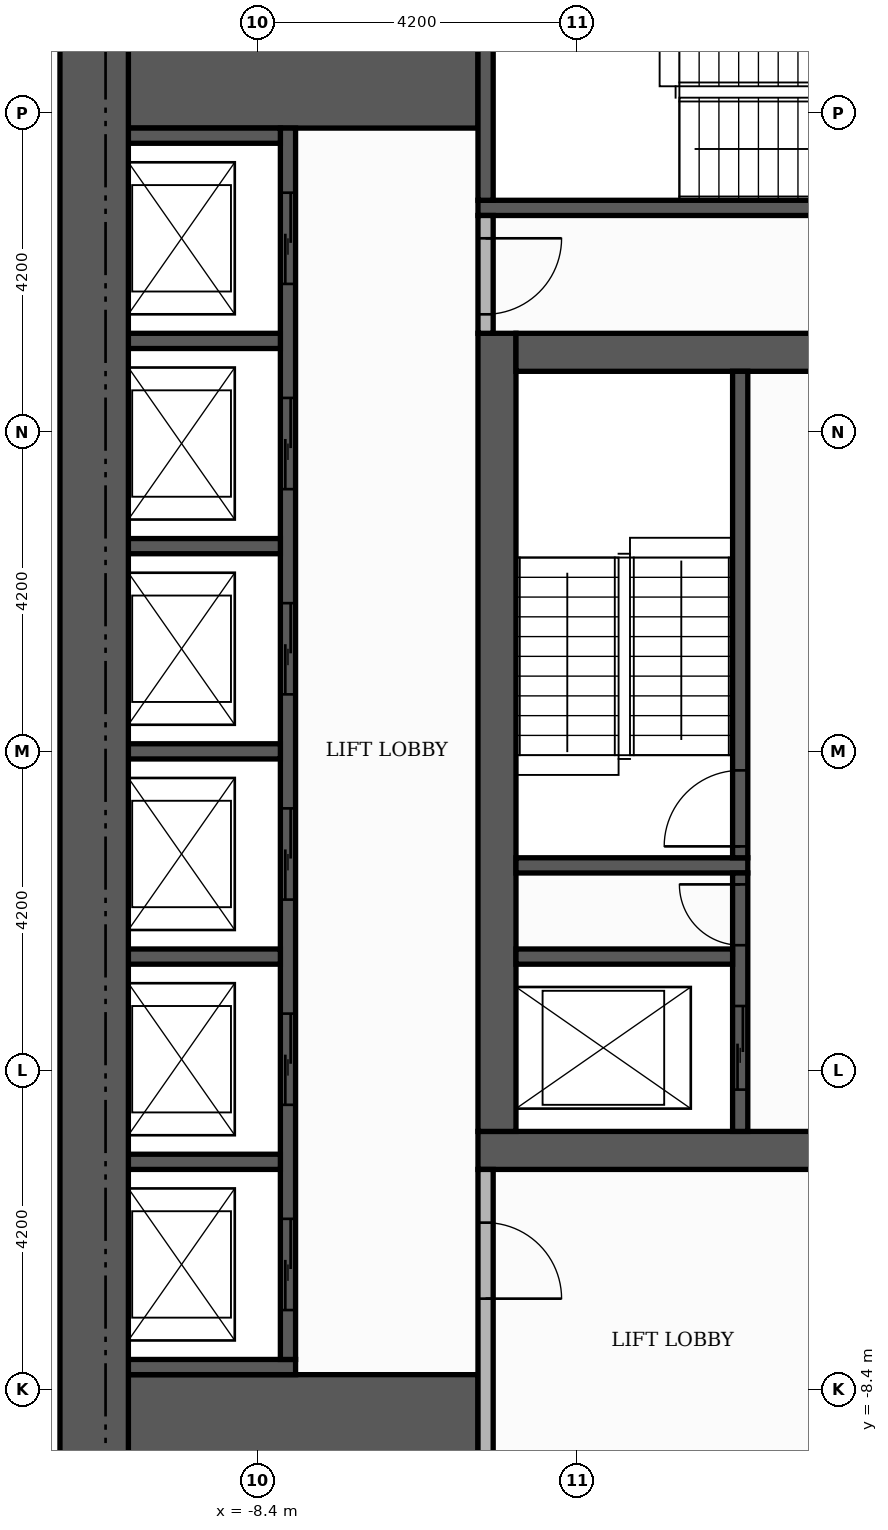
"""IFC4 building model, lengths in metres.
Left out: names, types, materials, properties, quantities, classifications, styles, units other than length and angle.
Written with IfcOpenShell. Run it as: python <this file> out.ifc"""

import sys

from ifc_helpers import new_model, si_unit, direction, frame, frame_2d, origin, place, context, subcontext, project, spatial, rectangle, extrude, element, fill, save


model = new_model("IFC4")
c1 = context("Model", 3, precision=1e-05, world=origin(), true_north=direction((0.0, 1.0)))
c2 = subcontext(c1, "Body", "Model", "MODEL_VIEW")
j1 = project(units=[si_unit("LENGTHUNIT", "METRE"), si_unit("PLANEANGLEUNIT", "RADIAN")], contexts=[c1])
p1 = place(None, origin())
s1 = spatial("IfcSite", under=j1, at=p1, CompositionType="ELEMENT")
p2 = place(p1, origin())
s2 = spatial("IfcBuilding", under=s1, at=p2, CompositionType="ELEMENT")
p3 = place(p2, frame((0.0, 0.0, 79.2)))
s3 = spatial("IfcBuildingStorey", under=s2, at=p3, CompositionType="ELEMENT", Elevation=79.2)
p4 = place(p3, frame((-5.5, -5.25, 0.0), z_axis=(0.0, 0.0, 1.0), x_axis=(1.0, 0.0, 0.0)))
e1 = element("IfcWall", 1, at=p4, inside=s3, PredefinedType="SHEAR", context=c2, shape_type="SweptSolid", body=[
    extrude(rectangle(XDim=11.0, YDim=0.5, at=frame_2d((5.5, 0.0))), origin(), (0.0, 0.0, 1.0), 3.48),
])
p5 = place(p4, frame((4.9, 0.0, 0.0)))
e2 = element("IfcOpeningElement", 2, at=p5, cuts=e1, PredefinedType="OPENING", context=c2, shape_type="SweptSolid", body=[
    extrude(rectangle(XDim=1.2, YDim=2.1, at=frame_2d((0.6, 1.05))), frame((0.0, 0.26, 0.0), z_axis=(0.0, -1.0, 0.0), x_axis=(1.0, 0.0, 0.0)), (0.0, 0.0, 1.0), 0.52),
])
p6 = place(p3, frame((-5.25, -5.0, 0.0), z_axis=(0.0, 0.0, 1.0), x_axis=(0.0, 1.0, 0.0)))
e3 = element("IfcWall", 3, at=p6, inside=s3, PredefinedType="SHEAR", context=c2, shape_type="SweptSolid", body=[
    extrude(rectangle(XDim=10.5, YDim=0.5, at=frame_2d((5.25, 0.0))), origin(), (0.0, 0.0, 1.0), 3.48),
])
p7 = place(p3, frame((-5.0, 5.25, 0.0), z_axis=(0.0, 0.0, 1.0), x_axis=(1.0, 0.0, 0.0)))
e4 = element("IfcWall", 4, at=p7, inside=s3, PredefinedType="SHEAR", context=c2, shape_type="SweptSolid", body=[
    extrude(rectangle(XDim=10.0, YDim=0.5, at=frame_2d((5.0, 0.0))), origin(), (0.0, 0.0, 1.0), 3.48),
])
p8 = place(p7, frame((4.4, 0.0, 0.0)))
e5 = element("IfcOpeningElement", 5, at=p8, cuts=e4, PredefinedType="OPENING", context=c2, shape_type="SweptSolid", body=[
    extrude(rectangle(XDim=1.2, YDim=2.1, at=frame_2d((0.6, 1.05))), frame((0.0, 0.26, 0.0), z_axis=(0.0, -1.0, 0.0), x_axis=(1.0, 0.0, 0.0)), (0.0, 0.0, 1.0), 0.52),
])
for number, where, z_axis, x_axis in (
    (6, (-10.1, -9.15, 0.0), (0.0, 0.0, 1.0), (1.0, 0.0, 0.0)),
    (7, (-10.1, 9.15, 0.0), (0.0, 0.0, 1.0), (1.0, 0.0, 0.0)),
):
    element("IfcWall", number, at=place(p3, frame(where, z_axis=z_axis, x_axis=x_axis)), inside=s3, PredefinedType="SHEAR", context=c2, shape_type="SweptSolid", body=[
        extrude(rectangle(XDim=4.6, YDim=1.9, at=frame_2d((2.3, 0.0))), origin(), (0.0, 0.0, 1.0), 3.48),
    ])
p9 = place(p3, frame((-5.0, -1.5, 0.0), z_axis=(0.0, 0.0, 1.0), x_axis=(1.0, 0.0, 0.0)))
e8 = element("IfcWall", 8, at=p9, inside=s3, PredefinedType="SHEAR", context=c2, shape_type="SweptSolid", body=[
    extrude(rectangle(XDim=3.05, YDim=0.2, at=frame_2d((1.525, 0.0))), origin(), (0.0, 0.0, 1.0), 3.48),
])
p10 = place(p3, frame((-2.05, -1.4, 0.0), z_axis=(0.0, 0.0, 1.0), x_axis=(0.0, 1.0, 0.0)))
e9 = element("IfcWall", 9, at=p10, inside=s3, PredefinedType="SHEAR", context=c2, shape_type="SweptSolid", body=[
    extrude(rectangle(XDim=6.4, YDim=0.2, at=frame_2d((3.2, 0.0))), origin(), (0.0, 0.0, 1.0), 3.48),
])
p11 = place(p10, frame((0.15, 0.0, 0.0)))
e10 = element("IfcOpeningElement", 10, at=p11, cuts=e9, PredefinedType="OPENING", context=c2, shape_type="SweptSolid", body=[
    extrude(rectangle(XDim=1.0, YDim=2.1, at=frame_2d((0.5, 1.05))), frame((0.0, 0.11, 0.0), z_axis=(0.0, -1.0, 0.0), x_axis=(1.0, 0.0, 0.0)), (0.0, 0.0, 1.0), 0.22),
])
p12 = place(p3, frame((-5.5, 7.15, 0.0), z_axis=(0.0, 0.0, 1.0), x_axis=(1.0, 0.0, 0.0)))
e11 = element("IfcWall", 11, at=p12, inside=s3, PredefinedType="SHEAR", context=c2, shape_type="SweptSolid", body=[
    extrude(rectangle(XDim=6.8, YDim=0.2, at=frame_2d((3.4, 0.0))), origin(), (0.0, 0.0, 1.0), 3.48),
])
p13 = place(p3, frame((-5.4, 7.25, 0.0), z_axis=(0.0, 0.0, 1.0), x_axis=(0.0, 1.0, 0.0)))
e12 = element("IfcWall", 12, at=p13, inside=s3, PredefinedType="SHEAR", context=c2, shape_type="SweptSolid", body=[
    extrude(rectangle(XDim=2.85, YDim=0.2, at=frame_2d((1.425, 0.0))), origin(), (0.0, 0.0, 1.0), 3.48),
])
p14 = place(p3, frame((-10.1, -8.1, 0.0), z_axis=(0.0, 0.0, 1.0), x_axis=(1.0, 0.0, 0.0)))
e13 = element("IfcWall", 13, at=p14, inside=s3, PredefinedType="SHEAR", context=c2, shape_type="SweptSolid", body=[
    extrude(rectangle(XDim=2.2, YDim=0.2, at=frame_2d((1.1, 0.0))), origin(), (0.0, 0.0, 1.0), 3.48),
])
p15 = place(p3, frame((-8.0, -8.0, 0.0), z_axis=(0.0, 0.0, 1.0), x_axis=(0.0, 1.0, 0.0)))
e14 = element("IfcWall", 14, at=p15, inside=s3, PredefinedType="SHEAR", context=c2, shape_type="SweptSolid", body=[
    extrude(rectangle(XDim=16.2, YDim=0.2, at=frame_2d((8.1, 0.0))), origin(), (0.0, 0.0, 1.0), 3.48),
])
p16 = place(p15, frame((0.65, 0.0, 0.0)))
e15 = element("IfcOpeningElement", 15, at=p16, cuts=e14, PredefinedType="OPENING", context=c2, shape_type="SweptSolid", body=[
    extrude(rectangle(XDim=1.2, YDim=2.1, at=frame_2d((0.6, 1.05))), frame((0.0, 0.11, 0.0), z_axis=(0.0, -1.0, 0.0), x_axis=(1.0, 0.0, 0.0)), (0.0, 0.0, 1.0), 0.22),
])
p17 = place(p15, frame((3.35, 0.0, 0.0)))
e16 = element("IfcOpeningElement", 16, at=p17, cuts=e14, PredefinedType="OPENING", context=c2, shape_type="SweptSolid", body=[
    extrude(rectangle(XDim=1.2, YDim=2.1, at=frame_2d((0.6, 1.05))), frame((0.0, 0.11, 0.0), z_axis=(0.0, -1.0, 0.0), x_axis=(1.0, 0.0, 0.0)), (0.0, 0.0, 1.0), 0.22),
])
p18 = place(p15, frame((6.05, 0.0, 0.0)))
e17 = element("IfcOpeningElement", 17, at=p18, cuts=e14, PredefinedType="OPENING", context=c2, shape_type="SweptSolid", body=[
    extrude(rectangle(XDim=1.2, YDim=2.1, at=frame_2d((0.6, 1.05))), frame((0.0, 0.11, 0.0), z_axis=(0.0, -1.0, 0.0), x_axis=(1.0, 0.0, 0.0)), (0.0, 0.0, 1.0), 0.22),
])
p19 = place(p15, frame((8.75, 0.0, 0.0)))
e18 = element("IfcOpeningElement", 18, at=p19, cuts=e14, PredefinedType="OPENING", context=c2, shape_type="SweptSolid", body=[
    extrude(rectangle(XDim=1.2, YDim=2.1, at=frame_2d((0.6, 1.05))), frame((0.0, 0.11, 0.0), z_axis=(0.0, -1.0, 0.0), x_axis=(1.0, 0.0, 0.0)), (0.0, 0.0, 1.0), 0.22),
])
p20 = place(p15, frame((11.45, 0.0, 0.0)))
e19 = element("IfcOpeningElement", 19, at=p20, cuts=e14, PredefinedType="OPENING", context=c2, shape_type="SweptSolid", body=[
    extrude(rectangle(XDim=1.2, YDim=2.1, at=frame_2d((0.6, 1.05))), frame((0.0, 0.11, 0.0), z_axis=(0.0, -1.0, 0.0), x_axis=(1.0, 0.0, 0.0)), (0.0, 0.0, 1.0), 0.22),
])
p21 = place(p15, frame((14.15, 0.0, 0.0)))
e20 = element("IfcOpeningElement", 20, at=p21, cuts=e14, PredefinedType="OPENING", context=c2, shape_type="SweptSolid", body=[
    extrude(rectangle(XDim=1.2, YDim=2.1, at=frame_2d((0.6, 1.05))), frame((0.0, 0.11, 0.0), z_axis=(0.0, -1.0, 0.0), x_axis=(1.0, 0.0, 0.0)), (0.0, 0.0, 1.0), 0.22),
])
p22 = place(p3, frame((-10.1, -5.4, 0.0), z_axis=(0.0, 0.0, 1.0), x_axis=(1.0, 0.0, 0.0)))
e21 = element("IfcWall", 21, at=p22, inside=s3, PredefinedType="SHEAR", context=c2, shape_type="SweptSolid", body=[
    extrude(rectangle(XDim=2.0, YDim=0.2, at=frame_2d((1.0, 0.0))), origin(), (0.0, 0.0, 1.0), 3.48),
])
p23 = place(p3, frame((-2.05, -5.0, 0.0), z_axis=(0.0, 0.0, 1.0), x_axis=(0.0, 1.0, 0.0)))
e22 = element("IfcWall", 22, at=p23, inside=s3, PredefinedType="SHEAR", context=c2, shape_type="SweptSolid", body=[
    extrude(rectangle(XDim=3.4, YDim=0.2, at=frame_2d((1.7, 0.0))), origin(), (0.0, 0.0, 1.0), 3.48),
])
p24 = place(p23, frame((0.55, 0.0, 0.0)))
e23 = element("IfcOpeningElement", 23, at=p24, cuts=e22, PredefinedType="OPENING", context=c2, shape_type="SweptSolid", body=[
    extrude(rectangle(XDim=1.1, YDim=2.1, at=frame_2d((0.55, 1.05))), frame((0.0, 0.11, 0.0), z_axis=(0.0, -1.0, 0.0), x_axis=(1.0, 0.0, 0.0)), (0.0, 0.0, 1.0), 0.22),
])
p25 = place(p23, frame((2.45, 0.0, 0.0)))
e24 = element("IfcOpeningElement", 24, at=p25, cuts=e22, PredefinedType="OPENING", context=c2, shape_type="SweptSolid", body=[
    extrude(rectangle(XDim=0.8, YDim=2.1, at=frame_2d((0.4, 1.05))), frame((0.0, 0.11, 0.0), z_axis=(0.0, -1.0, 0.0), x_axis=(1.0, 0.0, 0.0)), (0.0, 0.0, 1.0), 0.22),
])
p26 = place(p3, frame((-10.1, -2.7, 0.0), z_axis=(0.0, 0.0, 1.0), x_axis=(1.0, 0.0, 0.0)))
e25 = element("IfcWall", 25, at=p26, inside=s3, PredefinedType="SHEAR", context=c2, shape_type="SweptSolid", body=[
    extrude(rectangle(XDim=2.0, YDim=0.2, at=frame_2d((1.0, 0.0))), origin(), (0.0, 0.0, 1.0), 3.48),
])
p27 = place(p3, frame((-5.0, -2.7, 0.0), z_axis=(0.0, 0.0, 1.0), x_axis=(1.0, 0.0, 0.0)))
e26 = element("IfcWall", 26, at=p27, inside=s3, PredefinedType="SHEAR", context=c2, shape_type="SweptSolid", body=[
    extrude(rectangle(XDim=2.85, YDim=0.2, at=frame_2d((1.425, 0.0))), origin(), (0.0, 0.0, 1.0), 3.48),
])
for number, where, z_axis, x_axis in (
    (27, (-10.1, 0.0, 0.0), (0.0, 0.0, 1.0), (1.0, 0.0, 0.0)),
    (28, (-10.1, 2.7, 0.0), (0.0, 0.0, 1.0), (1.0, 0.0, 0.0)),
    (29, (-10.1, 5.4, 0.0), (0.0, 0.0, 1.0), (1.0, 0.0, 0.0)),
    (30, (-10.1, 8.1, 0.0), (0.0, 0.0, 1.0), (1.0, 0.0, 0.0)),
):
    element("IfcWall", number, at=place(p3, frame(where, z_axis=z_axis, x_axis=x_axis)), inside=s3, PredefinedType="SHEAR", context=c2, shape_type="SweptSolid", body=[
        extrude(rectangle(XDim=2.0, YDim=0.2, at=frame_2d((1.0, 0.0))), origin(), (0.0, 0.0, 1.0), 3.48),
    ])
p28 = place(p3, frame((-10.55, -10.1, 0.0), z_axis=(0.0, 0.0, 1.0), x_axis=(0.0, 1.0, 0.0)))
e31 = element("IfcWall", 31, at=p28, inside=s3, PredefinedType="SHEAR", context=c2, shape_type="SweptSolid", body=[
    extrude(rectangle(XDim=20.2, YDim=0.9, at=frame_2d((10.1, 0.0))), origin(), (0.0, 0.0, 1.0), 3.48),
])
p29 = place(p3, frame((-5.4, -10.1, 0.0), z_axis=(0.0, 0.0, 1.0), x_axis=(0.0, 1.0, 0.0)))
e32 = element("IfcWall", 32, at=p29, inside=s3, PredefinedType="PARTITIONING", context=c2, shape_type="SweptSolid", body=[
    extrude(rectangle(XDim=4.6, YDim=0.2, at=frame_2d((2.3, 0.0))), origin(), (0.0, 0.0, 1.0), 3.48),
])
p30 = place(p29, frame((2.9, 0.0, 0.0)))
e33 = element("IfcOpeningElement", 33, at=p30, cuts=e32, PredefinedType="OPENING", context=c2, shape_type="SweptSolid", body=[
    extrude(rectangle(XDim=1.0, YDim=2.1, at=frame_2d((0.5, 1.05))), frame((0.0, 0.11, 0.0), z_axis=(0.0, -1.0, 0.0), x_axis=(1.0, 0.0, 0.0)), (0.0, 0.0, 1.0), 0.22),
])
p31 = place(p3, frame((-5.4, 5.5, 0.0), z_axis=(0.0, 0.0, 1.0), x_axis=(0.0, 1.0, 0.0)))
e34 = element("IfcWall", 34, at=p31, inside=s3, PredefinedType="PARTITIONING", context=c2, shape_type="SweptSolid", body=[
    extrude(rectangle(XDim=1.55, YDim=0.2, at=frame_2d((0.775, 0.0))), origin(), (0.0, 0.0, 1.0), 3.48),
])
p32 = place(p31, frame((0.25, 0.0, 0.0)))
e35 = element("IfcOpeningElement", 35, at=p32, cuts=e34, PredefinedType="OPENING", context=c2, shape_type="SweptSolid", body=[
    extrude(rectangle(XDim=1.0, YDim=2.1, at=frame_2d((0.5, 1.05))), frame((0.0, 0.11, 0.0), z_axis=(0.0, -1.0, 0.0), x_axis=(1.0, 0.0, 0.0)), (0.0, 0.0, 1.0), 0.22),
])
p33 = place(p16, origin())
e36 = element("IfcDoor", 36, at=p33, inside=s3, OperationType="SLIDING_TO_LEFT", PredefinedType="DOOR", context=c2, shape_type="SweptSolid", body=[
    extrude(rectangle(XDim=1.2, YDim=2.1, at=frame_2d((0.6, 1.05))), frame((0.0, 0.025, 0.0), z_axis=(0.0, -1.0, 0.0), x_axis=(1.0, 0.0, 0.0)), (0.0, 0.0, 1.0), 0.05),
])
fill(e15, e36)
p34 = place(p17, origin())
e37 = element("IfcDoor", 37, at=p34, inside=s3, OperationType="SLIDING_TO_LEFT", PredefinedType="DOOR", context=c2, shape_type="SweptSolid", body=[
    extrude(rectangle(XDim=1.2, YDim=2.1, at=frame_2d((0.6, 1.05))), frame((0.0, 0.025, 0.0), z_axis=(0.0, -1.0, 0.0), x_axis=(1.0, 0.0, 0.0)), (0.0, 0.0, 1.0), 0.05),
])
fill(e16, e37)
p35 = place(p18, origin())
e38 = element("IfcDoor", 38, at=p35, inside=s3, OperationType="SLIDING_TO_LEFT", PredefinedType="DOOR", context=c2, shape_type="SweptSolid", body=[
    extrude(rectangle(XDim=1.2, YDim=2.1, at=frame_2d((0.6, 1.05))), frame((0.0, 0.025, 0.0), z_axis=(0.0, -1.0, 0.0), x_axis=(1.0, 0.0, 0.0)), (0.0, 0.0, 1.0), 0.05),
])
fill(e17, e38)
p36 = place(p19, origin())
e39 = element("IfcDoor", 39, at=p36, inside=s3, OperationType="SLIDING_TO_LEFT", PredefinedType="DOOR", context=c2, shape_type="SweptSolid", body=[
    extrude(rectangle(XDim=1.2, YDim=2.1, at=frame_2d((0.6, 1.05))), frame((0.0, 0.025, 0.0), z_axis=(0.0, -1.0, 0.0), x_axis=(1.0, 0.0, 0.0)), (0.0, 0.0, 1.0), 0.05),
])
fill(e18, e39)
p37 = place(p20, origin())
e40 = element("IfcDoor", 40, at=p37, inside=s3, OperationType="SLIDING_TO_LEFT", PredefinedType="DOOR", context=c2, shape_type="SweptSolid", body=[
    extrude(rectangle(XDim=1.2, YDim=2.1, at=frame_2d((0.6, 1.05))), frame((0.0, 0.025, 0.0), z_axis=(0.0, -1.0, 0.0), x_axis=(1.0, 0.0, 0.0)), (0.0, 0.0, 1.0), 0.05),
])
fill(e19, e40)
p38 = place(p21, origin())
e41 = element("IfcDoor", 41, at=p38, inside=s3, OperationType="SLIDING_TO_LEFT", PredefinedType="DOOR", context=c2, shape_type="SweptSolid", body=[
    extrude(rectangle(XDim=1.2, YDim=2.1, at=frame_2d((0.6, 1.05))), frame((0.0, 0.025, 0.0), z_axis=(0.0, -1.0, 0.0), x_axis=(1.0, 0.0, 0.0)), (0.0, 0.0, 1.0), 0.05),
])
fill(e20, e41)
p39 = place(p24, origin())
e42 = element("IfcDoor", 42, at=p39, inside=s3, OperationType="SLIDING_TO_LEFT", PredefinedType="DOOR", context=c2, shape_type="SweptSolid", body=[
    extrude(rectangle(XDim=1.1, YDim=2.1, at=frame_2d((0.55, 1.05))), frame((0.0, 0.025, 0.0), z_axis=(0.0, -1.0, 0.0), x_axis=(1.0, 0.0, 0.0)), (0.0, 0.0, 1.0), 0.05),
])
fill(e23, e42)
p40 = place(p11, origin())
e43 = element("IfcDoor", 43, at=p40, inside=s3, OperationType="SINGLE_SWING_LEFT", PredefinedType="DOOR", context=c2, shape_type="SweptSolid", body=[
    extrude(rectangle(XDim=1.0, YDim=2.1, at=frame_2d((0.5, 1.05))), frame((0.0, 0.025, 0.0), z_axis=(0.0, -1.0, 0.0), x_axis=(1.0, 0.0, 0.0)), (0.0, 0.0, 1.0), 0.05),
])
fill(e10, e43)
p41 = place(p25, origin())
e44 = element("IfcDoor", 44, at=p41, inside=s3, OperationType="SINGLE_SWING_RIGHT", PredefinedType="DOOR", context=c2, shape_type="SweptSolid", body=[
    extrude(rectangle(XDim=0.8, YDim=2.1, at=frame_2d((0.4, 1.05))), frame((0.0, 0.025, 0.0), z_axis=(0.0, -1.0, 0.0), x_axis=(1.0, 0.0, 0.0)), (0.0, 0.0, 1.0), 0.05),
])
fill(e24, e44)
p42 = place(p32, frame((1.0, 0.0, 0.0), z_axis=(0.0, 0.0, 1.0), x_axis=(-1.0, 0.0, 0.0)))
e45 = element("IfcDoor", 45, at=p42, inside=s3, OperationType="SINGLE_SWING_RIGHT", PredefinedType="DOOR", context=c2, shape_type="SweptSolid", body=[
    extrude(rectangle(XDim=1.0, YDim=2.1, at=frame_2d((0.5, 1.05))), frame((0.0, 0.025, 0.0), z_axis=(0.0, -1.0, 0.0), x_axis=(1.0, 0.0, 0.0)), (0.0, 0.0, 1.0), 0.05),
])
fill(e35, e45)
p43 = place(p30, frame((1.0, 0.0, 0.0), z_axis=(0.0, 0.0, 1.0), x_axis=(-1.0, 0.0, 0.0)))
e46 = element("IfcDoor", 46, at=p43, inside=s3, OperationType="SINGLE_SWING_LEFT", PredefinedType="DOOR", context=c2, shape_type="SweptSolid", body=[
    extrude(rectangle(XDim=1.0, YDim=2.1, at=frame_2d((0.5, 1.05))), frame((0.0, 0.025, 0.0), z_axis=(0.0, -1.0, 0.0), x_axis=(1.0, 0.0, 0.0)), (0.0, 0.0, 1.0), 0.05),
])
fill(e33, e46)
save(model, sys.argv[1])
